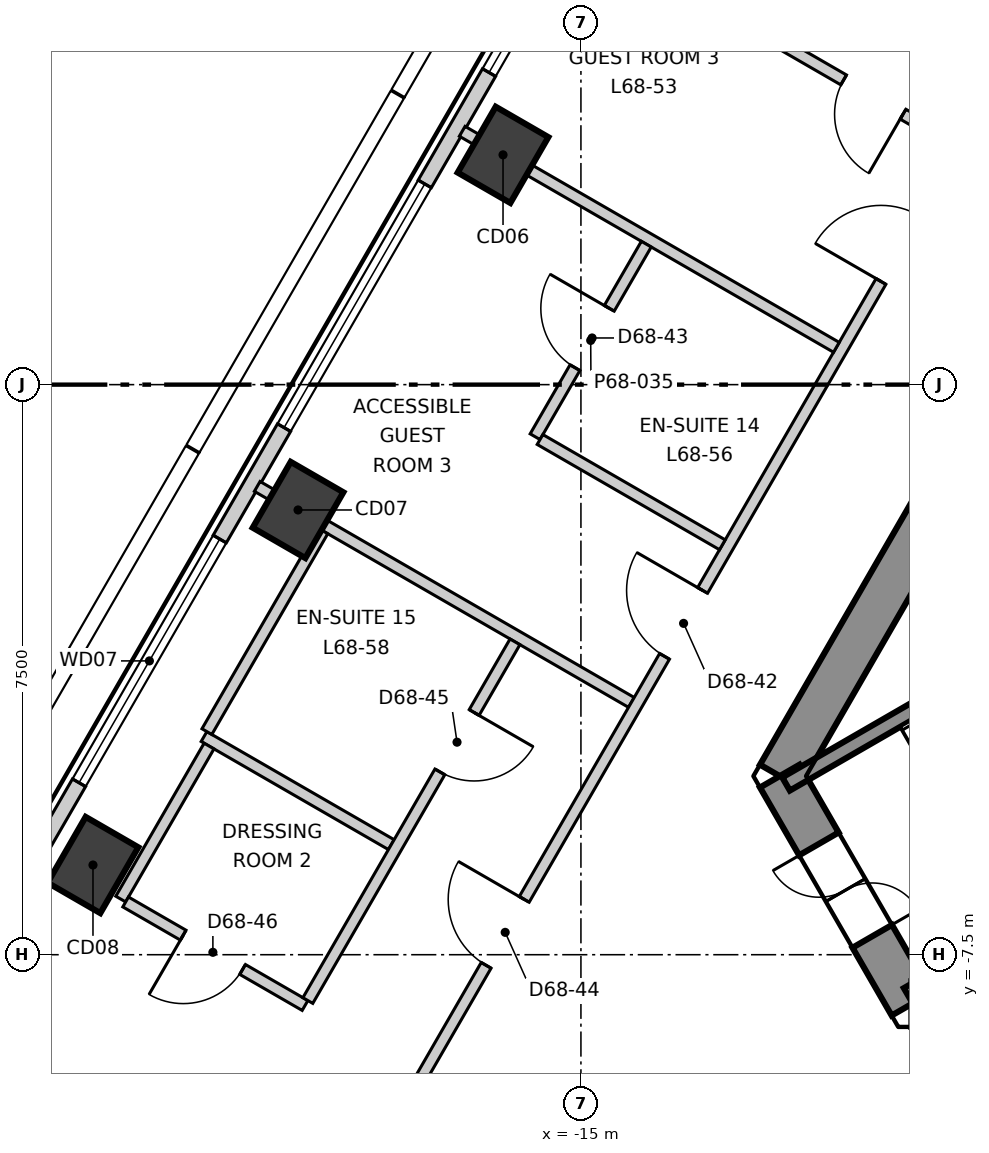
"""IFC4 building model, lengths in metres.
Left out: names, types, materials, properties, quantities, classifications, styles, units other than length and angle.
Written with IfcOpenShell. Run it as: python <this file> out.ifc"""

import sys

from ifc_helpers import new_model, si_unit, direction, frame, frame_2d, origin, origin_2d, place, context, subcontext, project, spatial, polyline, rectangle, outline, extrude, element, fill, save


model = new_model("IFC4")
c1 = context("Model", 3, precision=1e-05, world=origin(), true_north=direction((0.0, 1.0)))
c2 = subcontext(c1, "Body", "Model", "MODEL_VIEW")
j1 = project(units=[si_unit("LENGTHUNIT", "METRE"), si_unit("PLANEANGLEUNIT", "RADIAN")], contexts=[c1])
p1 = place(None, origin())
s1 = spatial("IfcSite", under=j1, at=p1, CompositionType="ELEMENT")
p2 = place(p1, origin())
s2 = spatial("IfcBuilding", under=s1, at=p2, CompositionType="ELEMENT")
p3 = place(p2, frame((0.0, 0.0, 289.9)))
s3 = spatial("IfcBuildingStorey", under=s2, at=p3, CompositionType="ELEMENT", Elevation=289.9)
p4 = place(p3, frame((-1.732, 13.3, -0.3), z_axis=(0.0, 0.0, 1.0), x_axis=(-0.500000539815, -0.866025092122, 0.0)))
e1 = element("IfcWall", 1, at=p4, inside=s3, PredefinedType="SHEAR", context=c2, shape_type="SweptSolid", body=[
    extrude(outline(polyline([(-0.173, -0.3), (1.795, -0.3), (3.763, -0.3), (5.732, -0.3), (7.7, -0.3), (9.668, -0.301), (11.637, -0.301), (13.605, -0.301), (15.573, -0.301), (17.542, -0.301), (19.51, -0.301), (21.478, -0.301), (21.131, 0.3), (19.226, 0.3), (17.321, 0.3), (15.415, 0.3), (13.51, 0.3), (11.605, 0.3), (9.699, 0.3), (7.794, 0.3), (5.889, 0.3), (3.984, 0.3), (2.078, 0.3), (0.173, 0.3), (-0.173, -0.3)])), origin(), (0.0, 0.0, 1.0), 3.6),
])
p5 = place(p4, frame((10.102, 0.0, 0.3)))
e2 = element("IfcOpeningElement", 2, at=p5, cuts=e1, PredefinedType="OPENING", context=c2, shape_type="SweptSolid", body=[
    extrude(rectangle(XDim=1.1, YDim=2.1, at=frame_2d((0.55, 1.05))), frame((0.0, 0.31, 0.0), z_axis=(0.0, -1.0, 0.0), x_axis=(1.0, 0.0, 0.0)), (0.0, 0.0, 1.0), 0.621),
])
p6 = place(p4, frame((16.328, 0.0, 0.3)))
e3 = element("IfcOpeningElement", 3, at=p6, cuts=e1, PredefinedType="OPENING", context=c2, shape_type="SweptSolid", body=[
    extrude(rectangle(XDim=1.0, YDim=2.1, at=frame_2d((0.5, 1.05))), frame((0.0, 0.31, 0.0), z_axis=(0.0, -1.0, 0.0), x_axis=(1.0, 0.0, 0.0)), (0.0, 0.0, 1.0), 0.621),
])
p7 = place(p4, frame((4.777, 0.0, 0.3)))
e4 = element("IfcOpeningElement", 4, at=p7, cuts=e1, PredefinedType="OPENING", context=c2, shape_type="SweptSolid", body=[
    extrude(rectangle(XDim=0.9, YDim=2.1, at=frame_2d((0.45, 1.05))), frame((0.0, 0.31, 0.0), z_axis=(0.0, -1.0, 0.0), x_axis=(1.0, 0.0, 0.0)), (0.0, 0.0, 1.0), 0.621),
])
p8 = place(p3, frame((-12.384, -5.15, -0.3), z_axis=(0.0, 0.0, 1.0), x_axis=(0.49997462182, -0.866040055388, 0.0)))
e5 = element("IfcWall", 5, at=p8, inside=s3, PredefinedType="SHEAR", context=c2, shape_type="SweptSolid", body=[
    extrude(outline(polyline([(-0.173, -0.301), (1.732, -0.301), (3.637, -0.3), (3.291, 0.3), (1.732, 0.3), (0.173, 0.3), (-0.173, -0.301)])), origin(), (0.0, 0.0, 1.0), 3.6),
])
p9 = place(p8, frame((1.032, 0.0, 0.3)))
e6 = element("IfcOpeningElement", 6, at=p9, cuts=e5, PredefinedType="OPENING", context=c2, shape_type="SweptSolid", body=[
    extrude(rectangle(XDim=1.4, YDim=2.1, at=frame_2d((0.7, 1.05))), frame((0.0, 0.31, 0.0), z_axis=(0.0, -1.0, 0.0), x_axis=(1.0, 0.0, 0.0)), (0.0, 0.0, 1.0), 0.621),
])
p10 = place(p3, frame((-10.652, -8.15, -0.3), z_axis=(0.0, 0.0, 1.0), x_axis=(1.0, 0.0, 0.0)))
e7 = element("IfcWall", 7, at=p10, inside=s3, PredefinedType="SHEAR", context=c2, shape_type="SweptSolid", body=[
    extrude(outline(polyline([(-0.173, -0.3), (1.795, -0.3), (3.763, -0.3), (5.731, -0.3), (7.7, -0.3), (9.668, -0.3), (11.636, -0.3), (13.604, -0.3), (15.573, -0.3), (17.541, -0.3), (19.509, -0.3), (21.477, -0.3), (21.131, 0.3), (19.226, 0.3), (17.321, 0.3), (15.415, 0.3), (13.51, 0.3), (11.605, 0.3), (9.699, 0.3), (7.794, 0.3), (5.889, 0.3), (3.984, 0.3), (2.078, 0.3), (0.173, 0.3), (-0.173, -0.3)])), origin(), (0.0, 0.0, 1.0), 3.6),
])
p11 = place(p10, frame((9.752, 0.0, 0.3)))
e8 = element("IfcOpeningElement", 8, at=p11, cuts=e7, PredefinedType="OPENING", context=c2, shape_type="SweptSolid", body=[
    extrude(rectangle(XDim=1.8, YDim=2.1, at=frame_2d((0.9, 1.05))), frame((0.0, 0.31, 0.0), z_axis=(0.0, -1.0, 0.0), x_axis=(1.0, 0.0, 0.0)), (0.0, 0.0, 1.0), 0.62),
])
p12 = place(p10, frame((4.156, 0.0, 0.3)))
e9 = element("IfcOpeningElement", 9, at=p12, cuts=e7, PredefinedType="OPENING", context=c2, shape_type="SweptSolid", body=[
    extrude(rectangle(XDim=0.9, YDim=2.1, at=frame_2d((0.45, 1.05))), frame((0.0, 0.31, 0.0), z_axis=(0.0, -1.0, 0.0), x_axis=(1.0, 0.0, 0.0)), (0.0, 0.0, 1.0), 0.62),
])
for number, where, z_axis, x_axis in (
    (10, (-16.025, 3.023, -0.3), (0.0, 0.0, 1.0), (0.5, 0.866, 0.0)),
    (11, (-18.722, -1.649, -0.3), (0.0, 0.0, 1.0), (0.5, 0.866, 0.0)),
    (12, (-21.42, -6.32, -0.3), (0.0, 0.0, 1.0), (0.5, 0.866, 0.0)),
):
    element("IfcColumn", number, at=place(p3, frame(where, z_axis=z_axis, x_axis=x_axis)), inside=s3, PredefinedType="COLUMN", context=c2, shape_type="SweptSolid", body=[
        extrude(rectangle(XDim=1.0, YDim=0.8, at=origin_2d()), origin(), (0.0, 0.0, 1.0), 3.6),
    ])
p13 = place(p3, frame((-2.494, 27.86, 0.0), z_axis=(0.0, 0.0, 1.0), x_axis=(-0.500008134474, -0.866020707292, 0.0)))
e13 = element("IfcWall", 13, at=p13, inside=s3, PredefinedType="ELEMENTEDWALL", context=c2, shape_type="SweptSolid", body=[
    extrude(rectangle(XDim=45.741, YDim=0.2, at=frame_2d((22.871, 0.0))), origin(), (0.0, 0.0, 1.0), 3.3),
])
p14 = place(p13, frame((2.15, 0.0, 0.9)))
e14 = element("IfcOpeningElement", 14, at=p14, cuts=e13, PredefinedType="OPENING", context=c2, shape_type="SweptSolid", body=[
    extrude(rectangle(XDim=3.7, YDim=2.2, at=frame_2d((1.85, 1.1))), frame((0.0, 0.11, 0.0), z_axis=(0.0, -1.0, 0.0), x_axis=(1.0, 0.0, 0.0)), (0.0, 0.0, 1.0), 0.22),
])
p15 = place(p13, frame((7.544, 0.0, 0.9)))
e15 = element("IfcOpeningElement", 15, at=p15, cuts=e13, PredefinedType="OPENING", context=c2, shape_type="SweptSolid", body=[
    extrude(rectangle(XDim=3.7, YDim=2.2, at=frame_2d((1.85, 1.1))), frame((0.0, 0.11, 0.0), z_axis=(0.0, -1.0, 0.0), x_axis=(1.0, 0.0, 0.0)), (0.0, 0.0, 1.0), 0.22),
])
p16 = place(p13, frame((12.939, 0.0, 0.9)))
e16 = element("IfcOpeningElement", 16, at=p16, cuts=e13, PredefinedType="OPENING", context=c2, shape_type="SweptSolid", body=[
    extrude(rectangle(XDim=3.7, YDim=2.2, at=frame_2d((1.85, 1.1))), frame((0.0, 0.11, 0.0), z_axis=(0.0, -1.0, 0.0), x_axis=(1.0, 0.0, 0.0)), (0.0, 0.0, 1.0), 0.22),
])
p17 = place(p13, frame((18.333, 0.0, 0.9)))
e17 = element("IfcOpeningElement", 17, at=p17, cuts=e13, PredefinedType="OPENING", context=c2, shape_type="SweptSolid", body=[
    extrude(rectangle(XDim=3.7, YDim=2.2, at=frame_2d((1.85, 1.1))), frame((0.0, 0.11, 0.0), z_axis=(0.0, -1.0, 0.0), x_axis=(1.0, 0.0, 0.0)), (0.0, 0.0, 1.0), 0.22),
])
p18 = place(p13, frame((23.728, 0.0, 0.9)))
e18 = element("IfcOpeningElement", 18, at=p18, cuts=e13, PredefinedType="OPENING", context=c2, shape_type="SweptSolid", body=[
    extrude(rectangle(XDim=3.7, YDim=2.2, at=frame_2d((1.85, 1.1))), frame((0.0, 0.11, 0.0), z_axis=(0.0, -1.0, 0.0), x_axis=(1.0, 0.0, 0.0)), (0.0, 0.0, 1.0), 0.22),
])
p19 = place(p13, frame((29.122, 0.0, 0.9)))
e19 = element("IfcOpeningElement", 19, at=p19, cuts=e13, PredefinedType="OPENING", context=c2, shape_type="SweptSolid", body=[
    extrude(rectangle(XDim=3.7, YDim=2.2, at=frame_2d((1.85, 1.1))), frame((0.0, 0.11, 0.0), z_axis=(0.0, -1.0, 0.0), x_axis=(1.0, 0.0, 0.0)), (0.0, 0.0, 1.0), 0.22),
])
p20 = place(p13, frame((34.517, 0.0, 0.9)))
e20 = element("IfcOpeningElement", 20, at=p20, cuts=e13, PredefinedType="OPENING", context=c2, shape_type="SweptSolid", body=[
    extrude(rectangle(XDim=3.7, YDim=2.2, at=frame_2d((1.85, 1.1))), frame((0.0, 0.11, 0.0), z_axis=(0.0, -1.0, 0.0), x_axis=(1.0, 0.0, 0.0)), (0.0, 0.0, 1.0), 0.22),
])
p21 = place(p13, frame((39.911, 0.0, 0.9)))
e21 = element("IfcOpeningElement", 21, at=p21, cuts=e13, PredefinedType="OPENING", context=c2, shape_type="SweptSolid", body=[
    extrude(rectangle(XDim=3.7, YDim=2.2, at=frame_2d((1.85, 1.1))), frame((0.0, 0.11, 0.0), z_axis=(0.0, -1.0, 0.0), x_axis=(1.0, 0.0, 0.0)), (0.0, 0.0, 1.0), 0.22),
])
p22 = place(p3, frame((-19.259, -1.339, 0.0), z_axis=(0.0, 0.0, 1.0), x_axis=(0.86606758311, -0.499926936147, 0.0)))
e22 = element("IfcWall", 22, at=p22, inside=s3, PredefinedType="PARTITIONING", context=c2, shape_type="SweptSolid", body=[
    extrude(rectangle(XDim=5.684, YDim=0.15, at=frame_2d((2.842, 0.0))), origin(), (0.0, 0.0, 1.0), 3.3),
])
p23 = place(p3, frame((-17.679, -10.12, 0.0), z_axis=(0.0, 0.0, 1.0), x_axis=(0.500008955215, 0.866020233427, 0.0)))
e23 = element("IfcWall", 23, at=p23, inside=s3, PredefinedType="PARTITIONING", context=c2, shape_type="SweptSolid", body=[
    extrude(rectangle(XDim=35.357, YDim=0.15, at=frame_2d((17.679, 0.0))), origin(), (0.0, 0.0, 1.0), 3.3),
])
p24 = place(p23, frame((31.407, 0.0, 0.0)))
e24 = element("IfcOpeningElement", 24, at=p24, cuts=e23, PredefinedType="OPENING", context=c2, shape_type="SweptSolid", body=[
    extrude(rectangle(XDim=1.0, YDim=2.1, at=frame_2d((0.5, 1.05))), frame((0.0, 0.085, 0.0), z_axis=(0.0, -1.0, 0.0), x_axis=(1.0, 0.0, 0.0)), (0.0, 0.0, 1.0), 0.17),
])
p25 = place(p23, frame((25.642, 0.0, 0.0)))
e25 = element("IfcOpeningElement", 25, at=p25, cuts=e23, PredefinedType="OPENING", context=c2, shape_type="SweptSolid", body=[
    extrude(rectangle(XDim=1.0, YDim=2.1, at=frame_2d((0.5, 1.05))), frame((0.0, 0.085, 0.0), z_axis=(0.0, -1.0, 0.0), x_axis=(1.0, 0.0, 0.0)), (0.0, 0.0, 1.0), 0.17),
])
p26 = place(p23, frame((18.348, 0.0, 0.0)))
e26 = element("IfcOpeningElement", 26, at=p26, cuts=e23, PredefinedType="OPENING", context=c2, shape_type="SweptSolid", body=[
    extrude(rectangle(XDim=1.0, YDim=2.1, at=frame_2d((0.5, 1.05))), frame((0.0, 0.085, 0.0), z_axis=(0.0, -1.0, 0.0), x_axis=(1.0, 0.0, 0.0)), (0.0, 0.0, 1.0), 0.17),
])
p27 = place(p23, frame((13.254, 0.0, 0.0)))
e27 = element("IfcOpeningElement", 27, at=p27, cuts=e23, PredefinedType="OPENING", context=c2, shape_type="SweptSolid", body=[
    extrude(rectangle(XDim=1.0, YDim=2.1, at=frame_2d((0.5, 1.05))), frame((0.0, 0.085, 0.0), z_axis=(0.0, -1.0, 0.0), x_axis=(1.0, 0.0, 0.0)), (0.0, 0.0, 1.0), 0.17),
])
p28 = place(p23, frame((7.559, 0.0, 0.0)))
e28 = element("IfcOpeningElement", 28, at=p28, cuts=e23, PredefinedType="OPENING", context=c2, shape_type="SweptSolid", body=[
    extrude(rectangle(XDim=1.0, YDim=2.1, at=frame_2d((0.5, 1.05))), frame((0.0, 0.085, 0.0), z_axis=(0.0, -1.0, 0.0), x_axis=(1.0, 0.0, 0.0)), (0.0, 0.0, 1.0), 0.17),
])
p29 = place(p23, frame((2.865, 0.0, 0.0)))
e29 = element("IfcOpeningElement", 29, at=p29, cuts=e23, PredefinedType="OPENING", context=c2, shape_type="SweptSolid", body=[
    extrude(rectangle(XDim=1.0, YDim=2.1, at=frame_2d((0.5, 1.05))), frame((0.0, 0.085, 0.0), z_axis=(0.0, -1.0, 0.0), x_axis=(1.0, 0.0, 0.0)), (0.0, 0.0, 1.0), 0.17),
])
p30 = place(p3, frame((-16.562, 3.333, 0.0), z_axis=(0.0, 0.0, 1.0), x_axis=(0.866048987239, -0.499959150034, 0.0)))
e30 = element("IfcWall", 30, at=p30, inside=s3, PredefinedType="PARTITIONING", context=c2, shape_type="SweptSolid", body=[
    extrude(rectangle(XDim=5.685, YDim=0.15, at=frame_2d((2.842, 0.0))), origin(), (0.0, 0.0, 1.0), 3.3),
])
p31 = place(p3, frame((-19.959, -4.63, 0.0), z_axis=(0.0, 0.0, 1.0), x_axis=(0.866085557634, -0.499895795999, 0.0)))
e31 = element("IfcWall", 31, at=p31, inside=s3, PredefinedType="PARTITIONING", context=c2, shape_type="SweptSolid", body=[
    extrude(rectangle(XDim=2.845, YDim=0.15, at=frame_2d((1.422, 0.0))), origin(), (0.0, 0.0, 1.0), 3.3),
])
p32 = place(p3, frame((-21.055, -6.768, 0.0), z_axis=(0.0, 0.0, 1.0), x_axis=(0.499855809005, 0.866108636491, 0.0)))
e32 = element("IfcWall", 32, at=p32, inside=s3, PredefinedType="PARTITIONING", context=c2, shape_type="SweptSolid", body=[
    extrude(rectangle(XDim=2.324, YDim=0.15, at=frame_2d((1.162, 0.0))), origin(), (0.0, 0.0, 1.0), 3.3),
])
p33 = place(p3, frame((-20.99, -6.806, 0.0), z_axis=(0.0, 0.0, 1.0), x_axis=(0.866112488944, -0.499849133735, 0.0)))
e33 = element("IfcWall", 33, at=p33, inside=s3, PredefinedType="PARTITIONING", context=c2, shape_type="SweptSolid", body=[
    extrude(rectangle(XDim=2.725, YDim=0.15, at=frame_2d((1.362, 0.0))), origin(), (0.0, 0.0, 1.0), 3.3),
])
p34 = place(p33, frame((0.875, 0.0, 0.0)))
e34 = element("IfcOpeningElement", 34, at=p34, cuts=e33, PredefinedType="OPENING", context=c2, shape_type="SweptSolid", body=[
    extrude(rectangle(XDim=0.9, YDim=2.1, at=frame_2d((0.45, 1.05))), frame((0.0, 0.085, 0.0), z_axis=(0.0, -1.0, 0.0), x_axis=(1.0, 0.0, 0.0)), (0.0, 0.0, 1.0), 0.17),
])
p35 = place(p3, frame((-18.593, -8.103, 0.0), z_axis=(0.0, 0.0, 1.0), x_axis=(0.500080528864, 0.865978905431, 0.0)))
e35 = element("IfcWall", 35, at=p35, inside=s3, PredefinedType="PARTITIONING", context=c2, shape_type="SweptSolid", body=[
    extrude(rectangle(XDim=5.449, YDim=0.15, at=frame_2d((2.725, 0.0))), origin(), (0.0, 0.0, 1.0), 3.3),
])
p36 = place(p35, frame((3.475, 0.0, 0.0)))
e36 = element("IfcOpeningElement", 36, at=p36, cuts=e35, PredefinedType="OPENING", context=c2, shape_type="SweptSolid", body=[
    extrude(rectangle(XDim=0.9, YDim=2.1, at=frame_2d((0.45, 1.05))), frame((0.0, 0.085, 0.0), z_axis=(0.0, -1.0, 0.0), x_axis=(1.0, 0.0, 0.0)), (0.0, 0.0, 1.0), 0.17),
])
p37 = place(p3, frame((-19.921, -4.565, 0.0), z_axis=(0.0, 0.0, 1.0), x_axis=(0.500048162978, 0.86599759509, 0.0)))
e37 = element("IfcWall", 37, at=p37, inside=s3, PredefinedType="PARTITIONING", context=c2, shape_type="SweptSolid", body=[
    extrude(rectangle(XDim=3.05, YDim=0.15, at=frame_2d((1.525, 0.0))), origin(), (0.0, 0.0, 1.0), 2.6),
])
p38 = place(p3, frame((-15.603, -0.685, 0.0), z_axis=(0.0, 0.0, 1.0), x_axis=(0.500187211558, 0.865917290158, 0.0)))
e38 = element("IfcWall", 38, at=p38, inside=s3, PredefinedType="PARTITIONING", context=c2, shape_type="SweptSolid", body=[
    extrude(rectangle(XDim=2.925, YDim=0.15, at=frame_2d((1.463, 0.0))), origin(), (0.0, 0.0, 1.0), 3.3),
])
p39 = place(p38, frame((1.05, 0.0, 0.0)))
e39 = element("IfcOpeningElement", 39, at=p39, cuts=e38, PredefinedType="OPENING", context=c2, shape_type="SweptSolid", body=[
    extrude(rectangle(XDim=0.9, YDim=2.1, at=frame_2d((0.45, 1.05))), frame((0.0, 0.085, 0.0), z_axis=(0.0, -1.0, 0.0), x_axis=(1.0, 0.0, 0.0)), (0.0, 0.0, 1.0), 0.17),
])
p40 = place(p3, frame((-15.538, -0.722, 0.0), z_axis=(0.0, 0.0, 1.0), x_axis=(0.866049104564, -0.499958946799, 0.0)))
e40 = element("IfcWall", 40, at=p40, inside=s3, PredefinedType="PARTITIONING", context=c2, shape_type="SweptSolid", body=[
    extrude(rectangle(XDim=2.77, YDim=0.15, at=frame_2d((1.385, 0.0))), origin(), (0.0, 0.0, 1.0), 3.3),
])
p41 = place(p3, frame((-12.3, 4.446, 0.0), z_axis=(0.0, 0.0, 1.0), x_axis=(0.865965520905, -0.500103705848, 0.0)))
e41 = element("IfcWall", 41, at=p41, inside=s3, PredefinedType="PARTITIONING", context=c2, shape_type="SweptSolid", body=[
    extrude(rectangle(XDim=2.55, YDim=0.15, at=frame_2d((1.275, 0.0))), origin(), (0.0, 0.0, 1.0), 3.3),
])
p42 = place(p41, frame((0.875, 0.0, 0.0)))
e42 = element("IfcOpeningElement", 42, at=p42, cuts=e41, PredefinedType="OPENING", context=c2, shape_type="SweptSolid", body=[
    extrude(rectangle(XDim=0.9, YDim=2.1, at=frame_2d((0.45, 1.05))), frame((0.0, 0.085, 0.0), z_axis=(0.0, -1.0, 0.0), x_axis=(1.0, 0.0, 0.0)), (0.0, 0.0, 1.0), 0.17),
])
p43 = place(p3, frame((-12.301, -5.254, 0.0), z_axis=(0.0, 0.0, 1.0), x_axis=(0.866068467981, 0.499925403204, 0.0)))
e43 = element("IfcWall", 43, at=p43, inside=s3, PredefinedType="SOLIDWALL", context=c2, shape_type="SweptSolid", body=[
    extrude(rectangle(XDim=6.665, YDim=0.2, at=frame_2d((3.332, 0.0))), origin(), (0.0, 0.0, 1.0), 3.3),
])
p44 = place(p3, frame((-10.701, -8.026, 0.0), z_axis=(0.0, 0.0, 1.0), x_axis=(0.866005022404, 0.500035299925, 0.0)))
e44 = element("IfcWall", 44, at=p44, inside=s3, PredefinedType="SOLIDWALL", context=c2, shape_type="SweptSolid", body=[
    extrude(rectangle(XDim=6.665, YDim=0.2, at=frame_2d((3.333, 0.0))), origin(), (0.0, 0.0, 1.0), 3.3),
])
p45 = place(p18, origin())
e45 = element("IfcWindow", 45, at=p45, inside=s3, PartitioningType="SINGLE_PANEL", PredefinedType="WINDOW", context=c2, shape_type="SweptSolid", body=[
    extrude(rectangle(XDim=3.7, YDim=2.2, at=frame_2d((1.85, 1.1))), frame((0.0, 0.03, 0.0), z_axis=(0.0, -1.0, 0.0), x_axis=(1.0, 0.0, 0.0)), (0.0, 0.0, 1.0), 0.06),
])
fill(e18, e45)
p46 = place(p19, origin())
e46 = element("IfcWindow", 46, at=p46, inside=s3, PartitioningType="SINGLE_PANEL", PredefinedType="WINDOW", context=c2, shape_type="SweptSolid", body=[
    extrude(rectangle(XDim=3.7, YDim=2.2, at=frame_2d((1.85, 1.1))), frame((0.0, 0.03, 0.0), z_axis=(0.0, -1.0, 0.0), x_axis=(1.0, 0.0, 0.0)), (0.0, 0.0, 1.0), 0.06),
])
fill(e19, e46)
p47 = place(p20, origin())
e47 = element("IfcWindow", 47, at=p47, inside=s3, PartitioningType="SINGLE_PANEL", PredefinedType="WINDOW", context=c2, shape_type="SweptSolid", body=[
    extrude(rectangle(XDim=3.7, YDim=2.2, at=frame_2d((1.85, 1.1))), frame((0.0, 0.03, 0.0), z_axis=(0.0, -1.0, 0.0), x_axis=(1.0, 0.0, 0.0)), (0.0, 0.0, 1.0), 0.06),
])
fill(e20, e47)
p48 = place(p27, origin())
e48 = element("IfcDoor", 48, at=p48, inside=s3, OperationType="SINGLE_SWING_RIGHT", PredefinedType="DOOR", context=c2, shape_type="SweptSolid", body=[
    extrude(rectangle(XDim=1.0, YDim=2.1, at=frame_2d((0.5, 1.05))), frame((0.0, 0.025, 0.0), z_axis=(0.0, -1.0, 0.0), x_axis=(1.0, 0.0, 0.0)), (0.0, 0.0, 1.0), 0.05),
])
fill(e27, e48)
p49 = place(p42, origin())
e49 = element("IfcDoor", 49, at=p49, inside=s3, OperationType="SINGLE_SWING_RIGHT", PredefinedType="DOOR", context=c2, shape_type="SweptSolid", body=[
    extrude(rectangle(XDim=0.9, YDim=2.1, at=frame_2d((0.45, 1.05))), frame((0.0, 0.025, 0.0), z_axis=(0.0, -1.0, 0.0), x_axis=(1.0, 0.0, 0.0)), (0.0, 0.0, 1.0), 0.05),
])
fill(e42, e49)
p50 = place(p28, origin())
e50 = element("IfcDoor", 50, at=p50, inside=s3, OperationType="SINGLE_SWING_LEFT", PredefinedType="DOOR", context=c2, shape_type="SweptSolid", body=[
    extrude(rectangle(XDim=1.0, YDim=2.1, at=frame_2d((0.5, 1.05))), frame((0.0, 0.025, 0.0), z_axis=(0.0, -1.0, 0.0), x_axis=(1.0, 0.0, 0.0)), (0.0, 0.0, 1.0), 0.05),
])
fill(e28, e50)
p51 = place(p39, origin())
e51 = element("IfcDoor", 51, at=p51, inside=s3, OperationType="SINGLE_SWING_LEFT", PredefinedType="DOOR", context=c2, shape_type="SweptSolid", body=[
    extrude(rectangle(XDim=0.9, YDim=2.1, at=frame_2d((0.45, 1.05))), frame((0.0, 0.025, 0.0), z_axis=(0.0, -1.0, 0.0), x_axis=(1.0, 0.0, 0.0)), (0.0, 0.0, 1.0), 0.05),
])
fill(e39, e51)
p52 = place(p29, origin())
e52 = element("IfcDoor", 52, at=p52, inside=s3, OperationType="SINGLE_SWING_LEFT", PredefinedType="DOOR", context=c2, shape_type="SweptSolid", body=[
    extrude(rectangle(XDim=1.0, YDim=2.1, at=frame_2d((0.5, 1.05))), frame((0.0, 0.025, 0.0), z_axis=(0.0, -1.0, 0.0), x_axis=(1.0, 0.0, 0.0)), (0.0, 0.0, 1.0), 0.05),
])
fill(e29, e52)
p53 = place(p36, origin())
e53 = element("IfcDoor", 53, at=p53, inside=s3, OperationType="SINGLE_SWING_RIGHT", PredefinedType="DOOR", context=c2, shape_type="SweptSolid", body=[
    extrude(rectangle(XDim=0.9, YDim=2.1, at=frame_2d((0.45, 1.05))), frame((0.0, 0.025, 0.0), z_axis=(0.0, -1.0, 0.0), x_axis=(1.0, 0.0, 0.0)), (0.0, 0.0, 1.0), 0.05),
])
fill(e36, e53)
p54 = place(p34, origin())
e54 = element("IfcDoor", 54, at=p54, inside=s3, OperationType="SINGLE_SWING_LEFT", PredefinedType="DOOR", context=c2, shape_type="SweptSolid", body=[
    extrude(rectangle(XDim=0.9, YDim=2.1, at=frame_2d((0.45, 1.05))), frame((0.0, 0.025, 0.0), z_axis=(0.0, -1.0, 0.0), x_axis=(1.0, 0.0, 0.0)), (0.0, 0.0, 1.0), 0.05),
])
fill(e34, e54)
p55 = place(p9, origin())
e55 = element("IfcDoor", 55, at=p55, inside=s3, OperationType="DOUBLE_DOOR_SINGLE_SWING", PredefinedType="DOOR", context=c2, shape_type="SweptSolid", body=[
    extrude(rectangle(XDim=1.4, YDim=2.1, at=frame_2d((0.7, 1.05))), frame((0.0, 0.025, 0.0), z_axis=(0.0, -1.0, 0.0), x_axis=(1.0, 0.0, 0.0)), (0.0, 0.0, 1.0), 0.05),
])
fill(e6, e55)
save(model, sys.argv[1])
